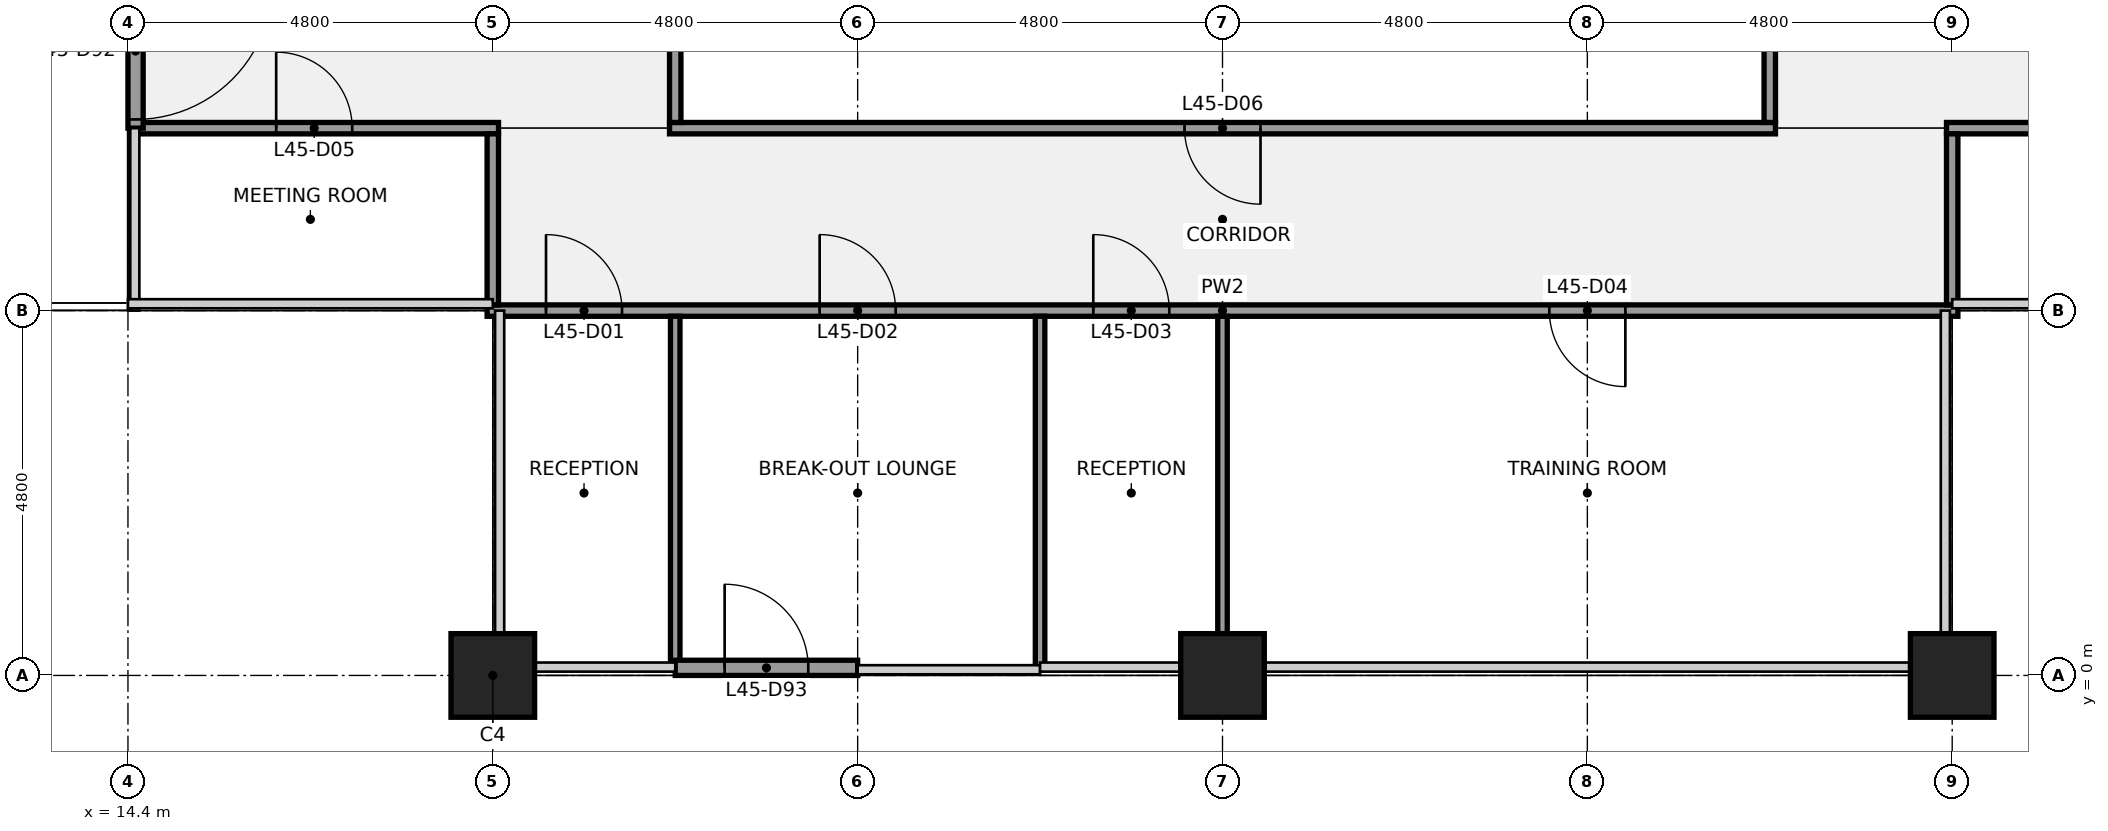
"""IFC4 building model, lengths in metres.
Left out: names, types, materials, properties, quantities, classifications, styles, units other than length and angle.
Written with IfcOpenShell. Run it as: python <this file> out.ifc"""

import sys

from ifc_helpers import new_model, si_unit, direction, frame, frame_2d, origin, origin_2d, place, context, subcontext, project, spatial, rectangle, extrude, element, fill, save


model = new_model("IFC4")
c1 = context("Model", 3, precision=1e-05, world=origin(), true_north=direction((0.0, 1.0)))
c2 = subcontext(c1, "Body", "Model", "MODEL_VIEW")
j1 = project(units=[si_unit("LENGTHUNIT", "METRE"), si_unit("PLANEANGLEUNIT", "RADIAN")], contexts=[c1])
p1 = place(None, origin())
s1 = spatial("IfcSite", under=j1, at=p1, CompositionType="ELEMENT")
p2 = place(p1, origin())
s2 = spatial("IfcBuilding", under=s1, at=p2, CompositionType="ELEMENT")
p3 = place(p2, frame((0.0, 0.0, 209.2)))
s3 = spatial("IfcBuildingStorey", under=s2, at=p3, CompositionType="ELEMENT", Elevation=209.2)
for number, where, z_axis, x_axis in (
    (1, (19.2, 0.0, 0.0), (0.0, 0.0, 1.0), (1.0, 0.0, 0.0)),
    (2, (28.8, 0.0, 0.0), (0.0, 0.0, 1.0), (1.0, 0.0, 0.0)),
    (3, (38.4, 0.0, 0.0), (0.0, 0.0, 1.0), (1.0, 0.0, 0.0)),
):
    element("IfcColumn", number, at=place(p3, frame(where, z_axis=z_axis, x_axis=x_axis)), inside=s3, PredefinedType="COLUMN", context=c2, shape_type="SweptSolid", body=[
        extrude(rectangle(XDim=1.1, YDim=1.1, at=origin_2d()), origin(), (0.0, 0.0, 1.0), 4.0),
    ])
p4 = place(p3, frame((19.125, 4.8, 0.0), z_axis=(0.0, 0.0, 1.0), x_axis=(1.0, 0.0, 0.0)))
e4 = element("IfcWall", 4, at=p4, inside=s3, PredefinedType="PARTITIONING", context=c2, shape_type="SweptSolid", body=[
    extrude(rectangle(XDim=19.35, YDim=0.15, at=frame_2d((9.675, 0.0))), origin(), (0.0, 0.0, 1.0), 2.87),
])
p5 = place(p4, frame((0.775, 0.0, 0.0)))
e5 = element("IfcOpeningElement", 5, at=p5, cuts=e4, PredefinedType="OPENING", context=c2, shape_type="SweptSolid", body=[
    extrude(rectangle(XDim=1.0, YDim=2.1, at=frame_2d((0.5, 1.05))), frame((0.0, 0.085, 0.0), z_axis=(0.0, -1.0, 0.0), x_axis=(1.0, 0.0, 0.0)), (0.0, 0.0, 1.0), 0.17),
])
p6 = place(p4, frame((4.375, 0.0, 0.0)))
e6 = element("IfcOpeningElement", 6, at=p6, cuts=e4, PredefinedType="OPENING", context=c2, shape_type="SweptSolid", body=[
    extrude(rectangle(XDim=1.0, YDim=2.1, at=frame_2d((0.5, 1.05))), frame((0.0, 0.085, 0.0), z_axis=(0.0, -1.0, 0.0), x_axis=(1.0, 0.0, 0.0)), (0.0, 0.0, 1.0), 0.17),
])
p7 = place(p4, frame((7.975, 0.0, 0.0)))
e7 = element("IfcOpeningElement", 7, at=p7, cuts=e4, PredefinedType="OPENING", context=c2, shape_type="SweptSolid", body=[
    extrude(rectangle(XDim=1.0, YDim=2.1, at=frame_2d((0.5, 1.05))), frame((0.0, 0.085, 0.0), z_axis=(0.0, -1.0, 0.0), x_axis=(1.0, 0.0, 0.0)), (0.0, 0.0, 1.0), 0.17),
])
p8 = place(p4, frame((13.975, 0.0, 0.0)))
e8 = element("IfcOpeningElement", 8, at=p8, cuts=e4, PredefinedType="OPENING", context=c2, shape_type="SweptSolid", body=[
    extrude(rectangle(XDim=1.0, YDim=2.1, at=frame_2d((0.5, 1.05))), frame((0.0, 0.085, 0.0), z_axis=(0.0, -1.0, 0.0), x_axis=(1.0, 0.0, 0.0)), (0.0, 0.0, 1.0), 0.17),
])
p9 = place(p3, frame((14.5, 7.2, 0.0), z_axis=(0.0, 0.0, 1.0), x_axis=(1.0, 0.0, 0.0)))
e9 = element("IfcWall", 9, at=p9, inside=s3, PredefinedType="PARTITIONING", context=c2, shape_type="SweptSolid", body=[
    extrude(rectangle(XDim=4.775, YDim=0.15, at=frame_2d((2.387, 0.0))), origin(), (0.0, 0.0, 1.0), 2.87),
])
p10 = place(p9, frame((1.85, 0.0, 0.0)))
e10 = element("IfcOpeningElement", 10, at=p10, cuts=e9, PredefinedType="OPENING", context=c2, shape_type="SweptSolid", body=[
    extrude(rectangle(XDim=1.0, YDim=2.1, at=frame_2d((0.5, 1.05))), frame((0.0, 0.085, 0.0), z_axis=(0.0, -1.0, 0.0), x_axis=(1.0, 0.0, 0.0)), (0.0, 0.0, 1.0), 0.17),
])
p11 = place(p3, frame((21.525, 7.2, 0.0), z_axis=(0.0, 0.0, 1.0), x_axis=(1.0, 0.0, 0.0)))
e11 = element("IfcWall", 11, at=p11, inside=s3, PredefinedType="PARTITIONING", context=c2, shape_type="SweptSolid", body=[
    extrude(rectangle(XDim=14.55, YDim=0.15, at=frame_2d((7.275, 0.0))), origin(), (0.0, 0.0, 1.0), 2.87),
])
p12 = place(p11, frame((6.775, 0.0, 0.0)))
e12 = element("IfcOpeningElement", 12, at=p12, cuts=e11, PredefinedType="OPENING", context=c2, shape_type="SweptSolid", body=[
    extrude(rectangle(XDim=1.0, YDim=2.1, at=frame_2d((0.5, 1.05))), frame((0.0, 0.085, 0.0), z_axis=(0.0, -1.0, 0.0), x_axis=(1.0, 0.0, 0.0)), (0.0, 0.0, 1.0), 0.17),
])
p13 = place(p3, frame((38.325, 7.2, 0.0), z_axis=(0.0, 0.0, 1.0), x_axis=(1.0, 0.0, 0.0)))
e13 = element("IfcWall", 13, at=p13, inside=s3, PredefinedType="PARTITIONING", context=c2, shape_type="SweptSolid", body=[
    extrude(rectangle(XDim=4.95, YDim=0.15, at=frame_2d((2.475, 0.0))), origin(), (0.0, 0.0, 1.0), 2.87),
])
p14 = place(p13, frame((1.975, 0.0, 0.0)))
e14 = element("IfcOpeningElement", 14, at=p14, cuts=e13, PredefinedType="OPENING", context=c2, shape_type="SweptSolid", body=[
    extrude(rectangle(XDim=1.0, YDim=2.1, at=frame_2d((0.5, 1.05))), frame((0.0, 0.085, 0.0), z_axis=(0.0, -1.0, 0.0), x_axis=(1.0, 0.0, 0.0)), (0.0, 0.0, 1.0), 0.17),
])
p15 = place(p3, frame((19.2, 4.875, 0.0), z_axis=(0.0, 0.0, 1.0), x_axis=(0.0, 1.0, 0.0)))
e15 = element("IfcWall", 15, at=p15, inside=s3, PredefinedType="PARTITIONING", context=c2, shape_type="SweptSolid", body=[
    extrude(rectangle(XDim=2.25, YDim=0.15, at=frame_2d((1.125, 0.0))), origin(), (0.0, 0.0, 1.0), 2.87),
])
p16 = place(p3, frame((21.6, 0.1, 0.0), z_axis=(0.0, 0.0, 1.0), x_axis=(0.0, 1.0, 0.0)))
e16 = element("IfcWall", 16, at=p16, inside=s3, PredefinedType="PARTITIONING", context=c2, shape_type="SweptSolid", body=[
    extrude(rectangle(XDim=4.625, YDim=0.125, at=frame_2d((2.312, 0.0))), origin(), (0.0, 0.0, 1.0), 2.87),
])
p17 = place(p3, frame((21.6, 7.275, 0.0), z_axis=(0.0, 0.0, 1.0), x_axis=(0.0, 1.0, 0.0)))
e17 = element("IfcWall", 17, at=p17, inside=s3, PredefinedType="PARTITIONING", context=c2, shape_type="SweptSolid", body=[
    extrude(rectangle(XDim=7.062, YDim=0.15, at=frame_2d((3.531, 0.0))), origin(), (0.0, 0.0, 1.0), 2.87),
])
p18 = place(p3, frame((26.4, 0.1, 0.0), z_axis=(0.0, 0.0, 1.0), x_axis=(0.0, 1.0, 0.0)))
e18 = element("IfcWall", 18, at=p18, inside=s3, PredefinedType="PARTITIONING", context=c2, shape_type="SweptSolid", body=[
    extrude(rectangle(XDim=4.625, YDim=0.125, at=frame_2d((2.312, 0.0))), origin(), (0.0, 0.0, 1.0), 2.87),
])
p19 = place(p3, frame((28.8, 0.55, 0.0), z_axis=(0.0, 0.0, 1.0), x_axis=(0.0, 1.0, 0.0)))
e19 = element("IfcWall", 19, at=p19, inside=s3, PredefinedType="PARTITIONING", context=c2, shape_type="SweptSolid", body=[
    extrude(rectangle(XDim=4.175, YDim=0.125, at=frame_2d((2.087, 0.0))), origin(), (0.0, 0.0, 1.0), 2.87),
])
p20 = place(p3, frame((36.0, 7.275, 0.0), z_axis=(0.0, 0.0, 1.0), x_axis=(0.0, 1.0, 0.0)))
e20 = element("IfcWall", 20, at=p20, inside=s3, PredefinedType="PARTITIONING", context=c2, shape_type="SweptSolid", body=[
    extrude(rectangle(XDim=7.062, YDim=0.15, at=frame_2d((3.531, 0.0))), origin(), (0.0, 0.0, 1.0), 2.87),
])
p21 = place(p3, frame((38.4, 4.875, 0.0), z_axis=(0.0, 0.0, 1.0), x_axis=(0.0, 1.0, 0.0)))
e21 = element("IfcWall", 21, at=p21, inside=s3, PredefinedType="PARTITIONING", context=c2, shape_type="SweptSolid", body=[
    extrude(rectangle(XDim=2.25, YDim=0.15, at=frame_2d((1.125, 0.0))), origin(), (0.0, 0.0, 1.0), 2.87),
])
p22 = place(p3, frame((14.5, 9.615, 0.0), z_axis=(0.0, 0.0, 1.0), x_axis=(0.0, -1.0, 0.0)))
e22 = element("IfcWall", 22, at=p22, inside=s3, PredefinedType="SOLIDWALL", context=c2, shape_type="SweptSolid", body=[
    extrude(rectangle(XDim=2.415, YDim=0.2, at=frame_2d((1.208, 0.0))), origin(), (0.0, 0.0, 1.0), 3.296),
])
p23 = place(p22, frame((0.5, 0.0, 0.0)))
e23 = element("IfcOpeningElement", 23, at=p23, cuts=e22, PredefinedType="OPENING", context=c2, shape_type="SweptSolid", body=[
    extrude(rectangle(XDim=1.8, YDim=2.1, at=frame_2d((0.9, 1.05))), frame((0.0, 0.11, 0.0), z_axis=(0.0, -1.0, 0.0), x_axis=(1.0, 0.0, 0.0)), (0.0, 0.0, 1.0), 0.22),
])
p24 = place(p3, frame((21.6, 0.1, 0.0), z_axis=(0.0, 0.0, 1.0), x_axis=(1.0, 0.0, 0.0)))
e24 = element("IfcWall", 24, at=p24, inside=s3, PredefinedType="SOLIDWALL", context=c2, shape_type="SweptSolid", body=[
    extrude(rectangle(XDim=2.4, YDim=0.2, at=frame_2d((1.2, 0.0))), origin(), (0.0, 0.0, 1.0), 3.314),
])
p25 = place(p24, frame((0.65, 0.0, 0.0)))
e25 = element("IfcOpeningElement", 25, at=p25, cuts=e24, PredefinedType="OPENING", context=c2, shape_type="SweptSolid", body=[
    extrude(rectangle(XDim=1.1, YDim=2.1, at=frame_2d((0.55, 1.05))), frame((0.0, 0.11, 0.0), z_axis=(0.0, -1.0, 0.0), x_axis=(1.0, 0.0, 0.0)), (0.0, 0.0, 1.0), 0.22),
])
for number, where, z_axis, x_axis in (
    (26, (19.2, -1.025, 0.0), (0.0, 0.0, 1.0), (1.0, 0.0, 0.0)),
    (27, (38.4, -1.025, 0.0), (0.0, 0.0, 1.0), (1.0, 0.0, 0.0)),
):
    element("IfcColumn", number, at=place(p3, frame(where, z_axis=z_axis, x_axis=x_axis)), inside=s3, PredefinedType="PILASTER", context=c2, shape_type="SweptSolid", body=[
        extrude(rectangle(XDim=2.4, YDim=0.95, at=origin_2d()), origin(), (0.0, 0.0, 1.0), 4.0),
    ])
p26 = place(p5, origin())
e28 = element("IfcDoor", 28, at=p26, inside=s3, OperationType="SINGLE_SWING_LEFT", PredefinedType="DOOR", context=c2, shape_type="SweptSolid", body=[
    extrude(rectangle(XDim=1.0, YDim=2.1, at=frame_2d((0.5, 1.05))), frame((0.0, 0.025, 0.0), z_axis=(0.0, -1.0, 0.0), x_axis=(1.0, 0.0, 0.0)), (0.0, 0.0, 1.0), 0.05),
])
fill(e5, e28)
p27 = place(p6, origin())
e29 = element("IfcDoor", 29, at=p27, inside=s3, OperationType="SINGLE_SWING_LEFT", PredefinedType="DOOR", context=c2, shape_type="SweptSolid", body=[
    extrude(rectangle(XDim=1.0, YDim=2.1, at=frame_2d((0.5, 1.05))), frame((0.0, 0.025, 0.0), z_axis=(0.0, -1.0, 0.0), x_axis=(1.0, 0.0, 0.0)), (0.0, 0.0, 1.0), 0.05),
])
fill(e6, e29)
p28 = place(p7, origin())
e30 = element("IfcDoor", 30, at=p28, inside=s3, OperationType="SINGLE_SWING_LEFT", PredefinedType="DOOR", context=c2, shape_type="SweptSolid", body=[
    extrude(rectangle(XDim=1.0, YDim=2.1, at=frame_2d((0.5, 1.05))), frame((0.0, 0.025, 0.0), z_axis=(0.0, -1.0, 0.0), x_axis=(1.0, 0.0, 0.0)), (0.0, 0.0, 1.0), 0.05),
])
fill(e7, e30)
p29 = place(p8, origin())
e31 = element("IfcDoor", 31, at=p29, inside=s3, OperationType="SINGLE_SWING_RIGHT", PredefinedType="DOOR", context=c2, shape_type="SweptSolid", body=[
    extrude(rectangle(XDim=1.0, YDim=2.1, at=frame_2d((0.5, 1.05))), frame((0.0, 0.025, 0.0), z_axis=(0.0, -1.0, 0.0), x_axis=(1.0, 0.0, 0.0)), (0.0, 0.0, 1.0), 0.05),
])
fill(e8, e31)
p30 = place(p10, origin())
e32 = element("IfcDoor", 32, at=p30, inside=s3, OperationType="SINGLE_SWING_LEFT", PredefinedType="DOOR", context=c2, shape_type="SweptSolid", body=[
    extrude(rectangle(XDim=1.0, YDim=2.1, at=frame_2d((0.5, 1.05))), frame((0.0, 0.025, 0.0), z_axis=(0.0, -1.0, 0.0), x_axis=(1.0, 0.0, 0.0)), (0.0, 0.0, 1.0), 0.05),
])
fill(e10, e32)
p31 = place(p12, origin())
e33 = element("IfcDoor", 33, at=p31, inside=s3, OperationType="SINGLE_SWING_RIGHT", PredefinedType="DOOR", context=c2, shape_type="SweptSolid", body=[
    extrude(rectangle(XDim=1.0, YDim=2.1, at=frame_2d((0.5, 1.05))), frame((0.0, 0.025, 0.0), z_axis=(0.0, -1.0, 0.0), x_axis=(1.0, 0.0, 0.0)), (0.0, 0.0, 1.0), 0.05),
])
fill(e12, e33)
p32 = place(p23, origin())
e34 = element("IfcDoor", 34, at=p32, inside=s3, OperationType="SINGLE_SWING_LEFT", PredefinedType="DOOR", context=c2, shape_type="SweptSolid", body=[
    extrude(rectangle(XDim=1.8, YDim=2.1, at=frame_2d((0.9, 1.05))), frame((0.0, 0.025, 0.0), z_axis=(0.0, -1.0, 0.0), x_axis=(1.0, 0.0, 0.0)), (0.0, 0.0, 1.0), 0.05),
])
fill(e23, e34)
p33 = place(p25, origin())
e35 = element("IfcDoor", 35, at=p33, inside=s3, OperationType="SINGLE_SWING_LEFT", PredefinedType="DOOR", context=c2, shape_type="SweptSolid", body=[
    extrude(rectangle(XDim=1.1, YDim=2.1, at=frame_2d((0.55, 1.05))), frame((0.0, 0.025, 0.0), z_axis=(0.0, -1.0, 0.0), x_axis=(1.0, 0.0, 0.0)), (0.0, 0.0, 1.0), 0.05),
])
fill(e25, e35)
save(model, sys.argv[1])
